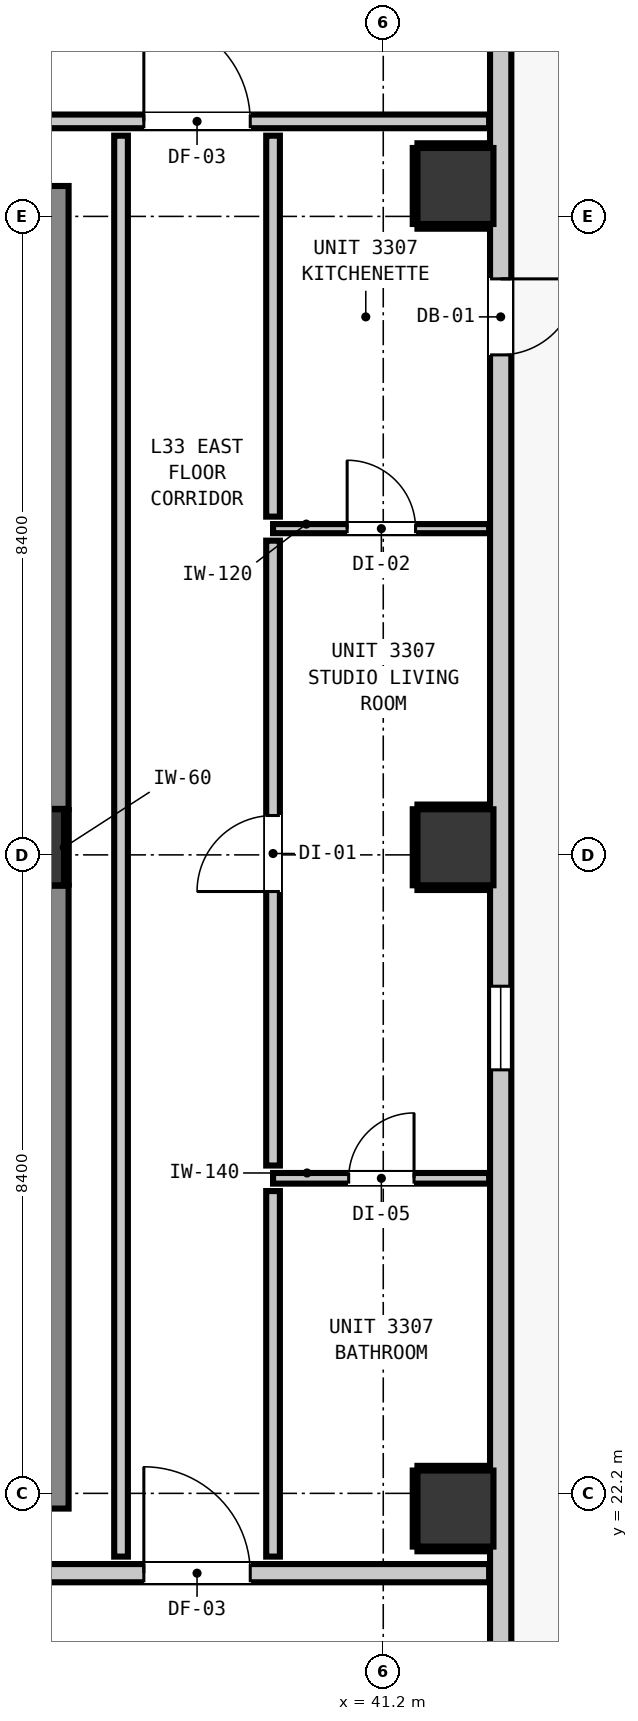
"""IFC4 building model, lengths in metres.
Left out: names, types, materials, properties, quantities, classifications, styles, units other than length and angle.
Written with IfcOpenShell. Run it as: python <this file> out.ifc"""

import sys

from ifc_helpers import new_model, si_unit, direction, frame, frame_2d, origin, origin_2d, place, context, subcontext, project, spatial, rectangle, extrude, element, fill, save


model = new_model("IFC4")
c1 = context("Model", 3, precision=1e-05, world=origin(), true_north=direction((0.0, 1.0)))
c2 = subcontext(c1, "Body", "Model", "MODEL_VIEW")
j1 = project(units=[si_unit("LENGTHUNIT", "METRE"), si_unit("PLANEANGLEUNIT", "RADIAN")], contexts=[c1])
p1 = place(None, origin())
s1 = spatial("IfcSite", under=j1, at=p1, CompositionType="ELEMENT")
p2 = place(p1, origin())
s2 = spatial("IfcBuilding", under=s1, at=p2, CompositionType="ELEMENT")
p3 = place(p2, frame((0.0, 0.0, 116.04)))
s3 = spatial("IfcBuildingStorey", under=s2, at=p3, CompositionType="ELEMENT", Elevation=116.04)
p4 = place(p3, frame((36.5, 30.7, 0.0), z_axis=(0.0, 0.0, 1.0), x_axis=(1.0, 0.0, 0.0)))
e1 = element("IfcColumn", 1, at=p4, inside=s3, PredefinedType="COLUMN", context=c2, shape_type="SweptSolid", body=[
    extrude(rectangle(XDim=1.0, YDim=1.0, at=origin_2d()), origin(), (0.0, 0.0, 1.0), 3.32),
])
p5 = place(p3, frame((36.56, 22.0, 0.0), z_axis=(0.0, 0.0, 1.0), x_axis=(0.0, 1.0, 0.0)))
e2 = element("IfcWall", 2, at=p5, inside=s3, PredefinedType="SHEAR", context=c2, shape_type="SweptSolid", body=[
    extrude(rectangle(XDim=8.195, YDim=1.0, at=frame_2d((4.098, 0.0))), origin(), (0.0, 0.0, 1.0), 3.32),
])
p6 = place(p3, frame((36.56, 31.205, 0.0), z_axis=(0.0, 0.0, 1.0), x_axis=(0.0, 1.0, 0.0)))
e3 = element("IfcWall", 3, at=p6, inside=s3, PredefinedType="SHEAR", context=c2, shape_type="SweptSolid", body=[
    extrude(rectangle(XDim=8.195, YDim=1.0, at=frame_2d((4.097, 0.0))), origin(), (0.0, 0.0, 1.0), 3.32),
])
for number, where, z_axis, x_axis in (
    (4, (42.15, 22.0, 0.0), (0.0, 0.0, 1.0), (1.0, 0.0, 0.0)),
    (5, (42.15, 30.7, 0.0), (0.0, 0.0, 1.0), (1.0, 0.0, 0.0)),
    (6, (42.15, 39.4, 0.0), (0.0, 0.0, 1.0), (1.0, 0.0, 0.0)),
):
    element("IfcColumn", number, at=place(p3, frame(where, z_axis=z_axis, x_axis=x_axis)), inside=s3, PredefinedType="COLUMN", context=c2, shape_type="SweptSolid", body=[
        extrude(rectangle(XDim=1.0, YDim=1.0, at=origin_2d()), origin(), (0.0, 0.0, 1.0), 3.32),
    ])
p7 = place(p3, frame((42.745, 43.645, 0.0), z_axis=(0.0, 0.0, 1.0), x_axis=(0.0, -1.0, 0.0)))
e7 = element("IfcWall", 7, at=p7, inside=s3, PredefinedType="STANDARD", context=c2, shape_type="SweptSolid", body=[
    extrude(rectangle(XDim=32.29, YDim=0.28, at=frame_2d((16.145, 0.0))), origin(), (0.0, 0.0, 1.0), 3.08),
])
p8 = place(p7, frame((5.467, 0.0, 0.0)))
e8 = element("IfcOpeningElement", 8, at=p8, cuts=e7, PredefinedType="OPENING", context=c2, shape_type="SweptSolid", body=[
    extrude(rectangle(XDim=1.0, YDim=2.15, at=frame_2d((0.5, 1.075))), frame((0.0, 0.15, 0.0), z_axis=(0.0, -1.0, 0.0), x_axis=(1.0, 0.0, 0.0)), (0.0, 0.0, 1.0), 0.3),
])
p9 = place(p7, frame((0.293, 0.0, 0.85)))
e9 = element("IfcOpeningElement", 9, at=p9, cuts=e7, PredefinedType="OPENING", context=c2, shape_type="SweptSolid", body=[
    extrude(rectangle(XDim=1.1, YDim=2.05, at=frame_2d((0.55, 1.025))), frame((0.0, 0.15, 0.0), z_axis=(0.0, -1.0, 0.0), x_axis=(1.0, 0.0, 0.0)), (0.0, 0.0, 1.0), 0.3),
])
p10 = place(p7, frame((14.773, 0.0, 0.85)))
e10 = element("IfcOpeningElement", 10, at=p10, cuts=e7, PredefinedType="OPENING", context=c2, shape_type="SweptSolid", body=[
    extrude(rectangle(XDim=1.1, YDim=2.05, at=frame_2d((0.55, 1.025))), frame((0.0, 0.15, 0.0), z_axis=(0.0, -1.0, 0.0), x_axis=(1.0, 0.0, 0.0)), (0.0, 0.0, 1.0), 0.3),
])
p11 = place(p3, frame((3.207, 21.15, 0.0), z_axis=(0.0, 0.0, 1.0), x_axis=(1.0, 0.0, 0.0)))
e11 = element("IfcWall", 11, at=p11, inside=s3, PredefinedType="PARTITIONING", context=c2, shape_type="SweptSolid", body=[
    extrude(rectangle(XDim=39.386, YDim=0.24, at=frame_2d((19.693, 0.0))), origin(), (0.0, 0.0, 1.0), 3.08),
])
p12 = place(p11, frame((15.003, 0.0, 0.0)))
e12 = element("IfcOpeningElement", 12, at=p12, cuts=e11, PredefinedType="OPENING", context=c2, shape_type="SweptSolid", body=[
    extrude(rectangle(XDim=1.1, YDim=2.15, at=frame_2d((0.55, 1.075))), frame((0.0, 0.13, 0.0), z_axis=(0.0, -1.0, 0.0), x_axis=(1.0, 0.0, 0.0)), (0.0, 0.0, 1.0), 0.26),
])
p13 = place(p11, frame((7.243, 0.0, 0.0)))
e13 = element("IfcOpeningElement", 13, at=p13, cuts=e11, PredefinedType="OPENING", context=c2, shape_type="SweptSolid", body=[
    extrude(rectangle(XDim=1.4, YDim=2.15, at=frame_2d((0.7, 1.075))), frame((0.0, 0.13, 0.0), z_axis=(0.0, -1.0, 0.0), x_axis=(1.0, 0.0, 0.0)), (0.0, 0.0, 1.0), 0.26),
])
p14 = place(p11, frame((34.843, 0.0, 0.0)))
e14 = element("IfcOpeningElement", 14, at=p14, cuts=e11, PredefinedType="OPENING", context=c2, shape_type="SweptSolid", body=[
    extrude(rectangle(XDim=1.4, YDim=2.15, at=frame_2d((0.7, 1.075))), frame((0.0, 0.13, 0.0), z_axis=(0.0, -1.0, 0.0), x_axis=(1.0, 0.0, 0.0)), (0.0, 0.0, 1.0), 0.26),
])
p15 = place(p3, frame((12.979, 40.25, 0.0), z_axis=(0.0, 0.0, 1.0), x_axis=(1.0, 0.0, 0.0)))
e15 = element("IfcWall", 15, at=p15, inside=s3, PredefinedType="PARTITIONING", context=c2, shape_type="SweptSolid", body=[
    extrude(rectangle(XDim=29.614, YDim=0.18, at=frame_2d((14.807, 0.0))), origin(), (0.0, 0.0, 1.0), 3.08),
])
p16 = place(p15, frame((4.456, 0.0, 0.0)))
e16 = element("IfcOpeningElement", 16, at=p16, cuts=e15, PredefinedType="OPENING", context=c2, shape_type="SweptSolid", body=[
    extrude(rectangle(XDim=1.4, YDim=2.15, at=frame_2d((0.7, 1.075))), frame((0.0, 0.1, 0.0), z_axis=(0.0, -1.0, 0.0), x_axis=(1.0, 0.0, 0.0)), (0.0, 0.0, 1.0), 0.2),
])
p17 = place(p15, frame((25.071, 0.0, 0.0)))
e17 = element("IfcOpeningElement", 17, at=p17, cuts=e15, PredefinedType="OPENING", context=c2, shape_type="SweptSolid", body=[
    extrude(rectangle(XDim=1.4, YDim=2.15, at=frame_2d((0.7, 1.075))), frame((0.0, 0.1, 0.0), z_axis=(0.0, -1.0, 0.0), x_axis=(1.0, 0.0, 0.0)), (0.0, 0.0, 1.0), 0.2),
])
p18 = place(p3, frame((39.75, 26.345, 0.0), z_axis=(0.0, 0.0, 1.0), x_axis=(1.0, 0.0, 0.0)))
e18 = element("IfcWall", 18, at=p18, inside=s3, PredefinedType="PARTITIONING", context=c2, shape_type="SweptSolid", body=[
    extrude(rectangle(XDim=2.843, YDim=0.14, at=frame_2d((1.421, 0.0))), origin(), (0.0, 0.0, 1.0), 3.08),
])
p19 = place(p18, frame((0.995, 0.0, 0.0)))
e19 = element("IfcOpeningElement", 19, at=p19, cuts=e18, PredefinedType="OPENING", context=c2, shape_type="SweptSolid", body=[
    extrude(rectangle(XDim=0.86, YDim=2.02, at=frame_2d((0.43, 1.01))), frame((0.0, 0.08, 0.0), z_axis=(0.0, -1.0, 0.0), x_axis=(1.0, 0.0, 0.0)), (0.0, 0.0, 1.0), 0.16),
])
p20 = place(p3, frame((39.75, 34.892, 0.0), z_axis=(0.0, 0.0, 1.0), x_axis=(1.0, 0.0, 0.0)))
e20 = element("IfcWall", 20, at=p20, inside=s3, PredefinedType="PARTITIONING", context=c2, shape_type="SweptSolid", body=[
    extrude(rectangle(XDim=2.843, YDim=0.12, at=frame_2d((1.421, 0.0))), origin(), (0.0, 0.0, 1.0), 3.08),
])
p21 = place(p20, frame((0.975, 0.0, 0.0)))
e21 = element("IfcOpeningElement", 21, at=p21, cuts=e20, PredefinedType="OPENING", context=c2, shape_type="SweptSolid", body=[
    extrude(rectangle(XDim=0.9, YDim=2.1, at=frame_2d((0.45, 1.05))), frame((0.0, 0.07, 0.0), z_axis=(0.0, -1.0, 0.0), x_axis=(1.0, 0.0, 0.0)), (0.0, 0.0, 1.0), 0.14),
])
p22 = place(p3, frame((37.75, 21.368, 0.0), z_axis=(0.0, 0.0, 1.0), x_axis=(0.0, 1.0, 0.0)))
e22 = element("IfcWall", 22, at=p22, inside=s3, PredefinedType="PARTITIONING", context=c2, shape_type="SweptSolid", body=[
    extrude(rectangle(XDim=18.694, YDim=0.18, at=frame_2d((9.347, 0.0))), origin(), (0.0, 0.0, 1.0), 3.08),
])
p23 = place(p3, frame((39.75, 21.368, 0.0), z_axis=(0.0, 0.0, 1.0), x_axis=(0.0, 1.0, 0.0)))
e23 = element("IfcWall", 23, at=p23, inside=s3, PredefinedType="PARTITIONING", context=c2, shape_type="SweptSolid", body=[
    extrude(rectangle(XDim=4.809, YDim=0.18, at=frame_2d((2.405, 0.0))), origin(), (0.0, 0.0, 1.0), 3.08),
])
p24 = place(p3, frame((39.75, 26.513, 0.0), z_axis=(0.0, 0.0, 1.0), x_axis=(0.0, 1.0, 0.0)))
e24 = element("IfcWall", 24, at=p24, inside=s3, PredefinedType="PARTITIONING", context=c2, shape_type="SweptSolid", body=[
    extrude(rectangle(XDim=8.221, YDim=0.18, at=frame_2d((4.11, 0.0))), origin(), (0.0, 0.0, 1.0), 3.08),
])
p25 = place(p24, frame((3.605, 0.0, 0.0)))
e25 = element("IfcOpeningElement", 25, at=p25, cuts=e24, PredefinedType="OPENING", context=c2, shape_type="SweptSolid", body=[
    extrude(rectangle(XDim=1.0, YDim=2.15, at=frame_2d((0.5, 1.075))), frame((0.0, 0.1, 0.0), z_axis=(0.0, -1.0, 0.0), x_axis=(1.0, 0.0, 0.0)), (0.0, 0.0, 1.0), 0.2),
])
p26 = place(p3, frame((39.75, 35.05, 0.0), z_axis=(0.0, 0.0, 1.0), x_axis=(0.0, 1.0, 0.0)))
e26 = element("IfcWall", 26, at=p26, inside=s3, PredefinedType="PARTITIONING", context=c2, shape_type="SweptSolid", body=[
    extrude(rectangle(XDim=5.012, YDim=0.18, at=frame_2d((2.506, 0.0))), origin(), (0.0, 0.0, 1.0), 3.08),
])
p27 = place(p3, frame((37.032, 30.21, 0.0), z_axis=(0.0, 0.0, 1.0), x_axis=(0.0, 1.0, 0.0)))
e27 = element("IfcWall", 27, at=p27, inside=s3, PredefinedType="PARTITIONING", context=c2, shape_type="SweptSolid", body=[
    extrude(rectangle(XDim=0.98, YDim=0.06, at=frame_2d((0.49, 0.0))), origin(), (0.0, 0.0, 1.0), 1.45),
])
for number, where, z_axis, x_axis in (
    (28, (41.65, 21.468, 0.0), (0.0, 0.0, 1.0), (1.0, 0.0, 0.0)),
    (29, (41.65, 22.532, 0.0), (0.0, 0.0, 1.0), (1.0, 0.0, 0.0)),
):
    element("IfcWall", number, at=place(p3, frame(where, z_axis=z_axis, x_axis=x_axis)), inside=s3, PredefinedType="PARTITIONING", context=c2, shape_type="SweptSolid", body=[
        extrude(rectangle(XDim=0.94, YDim=0.06, at=frame_2d((0.47, 0.0))), origin(), (0.0, 0.0, 1.0), 1.45),
    ])
p28 = place(p3, frame((41.618, 21.5, 0.0), z_axis=(0.0, 0.0, 1.0), x_axis=(0.0, 1.0, 0.0)))
e30 = element("IfcWall", 30, at=p28, inside=s3, PredefinedType="PARTITIONING", context=c2, shape_type="SweptSolid", body=[
    extrude(rectangle(XDim=1.0, YDim=0.06, at=frame_2d((0.5, 0.0))), origin(), (0.0, 0.0, 1.0), 1.45),
])
for number, where, z_axis, x_axis in (
    (31, (41.65, 30.168, 0.0), (0.0, 0.0, 1.0), (1.0, 0.0, 0.0)),
    (32, (41.65, 31.232, 0.0), (0.0, 0.0, 1.0), (1.0, 0.0, 0.0)),
):
    element("IfcWall", number, at=place(p3, frame(where, z_axis=z_axis, x_axis=x_axis)), inside=s3, PredefinedType="PARTITIONING", context=c2, shape_type="SweptSolid", body=[
        extrude(rectangle(XDim=0.94, YDim=0.06, at=frame_2d((0.47, 0.0))), origin(), (0.0, 0.0, 1.0), 1.45),
    ])
p29 = place(p3, frame((41.618, 30.2, 0.0), z_axis=(0.0, 0.0, 1.0), x_axis=(0.0, 1.0, 0.0)))
e33 = element("IfcWall", 33, at=p29, inside=s3, PredefinedType="PARTITIONING", context=c2, shape_type="SweptSolid", body=[
    extrude(rectangle(XDim=1.0, YDim=0.06, at=frame_2d((0.5, 0.0))), origin(), (0.0, 0.0, 1.0), 1.45),
])
for number, where, z_axis, x_axis in (
    (34, (41.65, 38.868, 0.0), (0.0, 0.0, 1.0), (1.0, 0.0, 0.0)),
    (35, (41.65, 39.932, 0.0), (0.0, 0.0, 1.0), (1.0, 0.0, 0.0)),
):
    element("IfcWall", number, at=place(p3, frame(where, z_axis=z_axis, x_axis=x_axis)), inside=s3, PredefinedType="PARTITIONING", context=c2, shape_type="SweptSolid", body=[
        extrude(rectangle(XDim=0.94, YDim=0.06, at=frame_2d((0.47, 0.0))), origin(), (0.0, 0.0, 1.0), 1.45),
    ])
p30 = place(p3, frame((41.618, 38.9, 0.0), z_axis=(0.0, 0.0, 1.0), x_axis=(0.0, 1.0, 0.0)))
e36 = element("IfcWall", 36, at=p30, inside=s3, PredefinedType="PARTITIONING", context=c2, shape_type="SweptSolid", body=[
    extrude(rectangle(XDim=1.0, YDim=0.06, at=frame_2d((0.5, 0.0))), origin(), (0.0, 0.0, 1.0), 1.45),
])
p31 = place(p8, origin())
e37 = element("IfcDoor", 37, at=p31, inside=s3, OperationType="SINGLE_SWING_LEFT", PredefinedType="DOOR", context=c2, shape_type="SweptSolid", body=[
    extrude(rectangle(XDim=1.0, YDim=2.15, at=frame_2d((0.5, 1.075))), frame((0.0, 0.025, 0.0), z_axis=(0.0, -1.0, 0.0), x_axis=(1.0, 0.0, 0.0)), (0.0, 0.0, 1.0), 0.05),
])
fill(e8, e37)
p32 = place(p10, origin())
e38 = element("IfcWindow", 38, at=p32, inside=s3, PartitioningType="SINGLE_PANEL", PredefinedType="WINDOW", context=c2, shape_type="SweptSolid", body=[
    extrude(rectangle(XDim=1.1, YDim=2.05, at=frame_2d((0.55, 1.025))), frame((0.0, 0.03, 0.0), z_axis=(0.0, -1.0, 0.0), x_axis=(1.0, 0.0, 0.0)), (0.0, 0.0, 1.0), 0.06),
])
fill(e10, e38)
p33 = place(p14, origin())
e39 = element("IfcDoor", 39, at=p33, inside=s3, OperationType="SINGLE_SWING_LEFT", PredefinedType="DOOR", context=c2, shape_type="SweptSolid", body=[
    extrude(rectangle(XDim=1.4, YDim=2.15, at=frame_2d((0.7, 1.075))), frame((0.0, 0.025, 0.0), z_axis=(0.0, -1.0, 0.0), x_axis=(1.0, 0.0, 0.0)), (0.0, 0.0, 1.0), 0.05),
])
fill(e14, e39)
p34 = place(p17, origin())
e40 = element("IfcDoor", 40, at=p34, inside=s3, OperationType="SINGLE_SWING_LEFT", PredefinedType="DOOR", context=c2, shape_type="SweptSolid", body=[
    extrude(rectangle(XDim=1.4, YDim=2.15, at=frame_2d((0.7, 1.075))), frame((0.0, 0.025, 0.0), z_axis=(0.0, -1.0, 0.0), x_axis=(1.0, 0.0, 0.0)), (0.0, 0.0, 1.0), 0.05),
])
fill(e17, e40)
p35 = place(p25, origin())
e41 = element("IfcDoor", 41, at=p35, inside=s3, OperationType="SINGLE_SWING_LEFT", PredefinedType="DOOR", context=c2, shape_type="SweptSolid", body=[
    extrude(rectangle(XDim=1.0, YDim=2.15, at=frame_2d((0.5, 1.075))), frame((0.0, 0.025, 0.0), z_axis=(0.0, -1.0, 0.0), x_axis=(1.0, 0.0, 0.0)), (0.0, 0.0, 1.0), 0.05),
])
fill(e25, e41)
p36 = place(p19, origin())
e42 = element("IfcDoor", 42, at=p36, inside=s3, OperationType="SINGLE_SWING_RIGHT", PredefinedType="DOOR", context=c2, shape_type="SweptSolid", body=[
    extrude(rectangle(XDim=0.86, YDim=2.02, at=frame_2d((0.43, 1.01))), frame((0.0, 0.025, 0.0), z_axis=(0.0, -1.0, 0.0), x_axis=(1.0, 0.0, 0.0)), (0.0, 0.0, 1.0), 0.05),
])
fill(e19, e42)
p37 = place(p21, origin())
e43 = element("IfcDoor", 43, at=p37, inside=s3, OperationType="SINGLE_SWING_LEFT", PredefinedType="DOOR", context=c2, shape_type="SweptSolid", body=[
    extrude(rectangle(XDim=0.9, YDim=2.1, at=frame_2d((0.45, 1.05))), frame((0.0, 0.025, 0.0), z_axis=(0.0, -1.0, 0.0), x_axis=(1.0, 0.0, 0.0)), (0.0, 0.0, 1.0), 0.05),
])
fill(e21, e43)
save(model, sys.argv[1])
